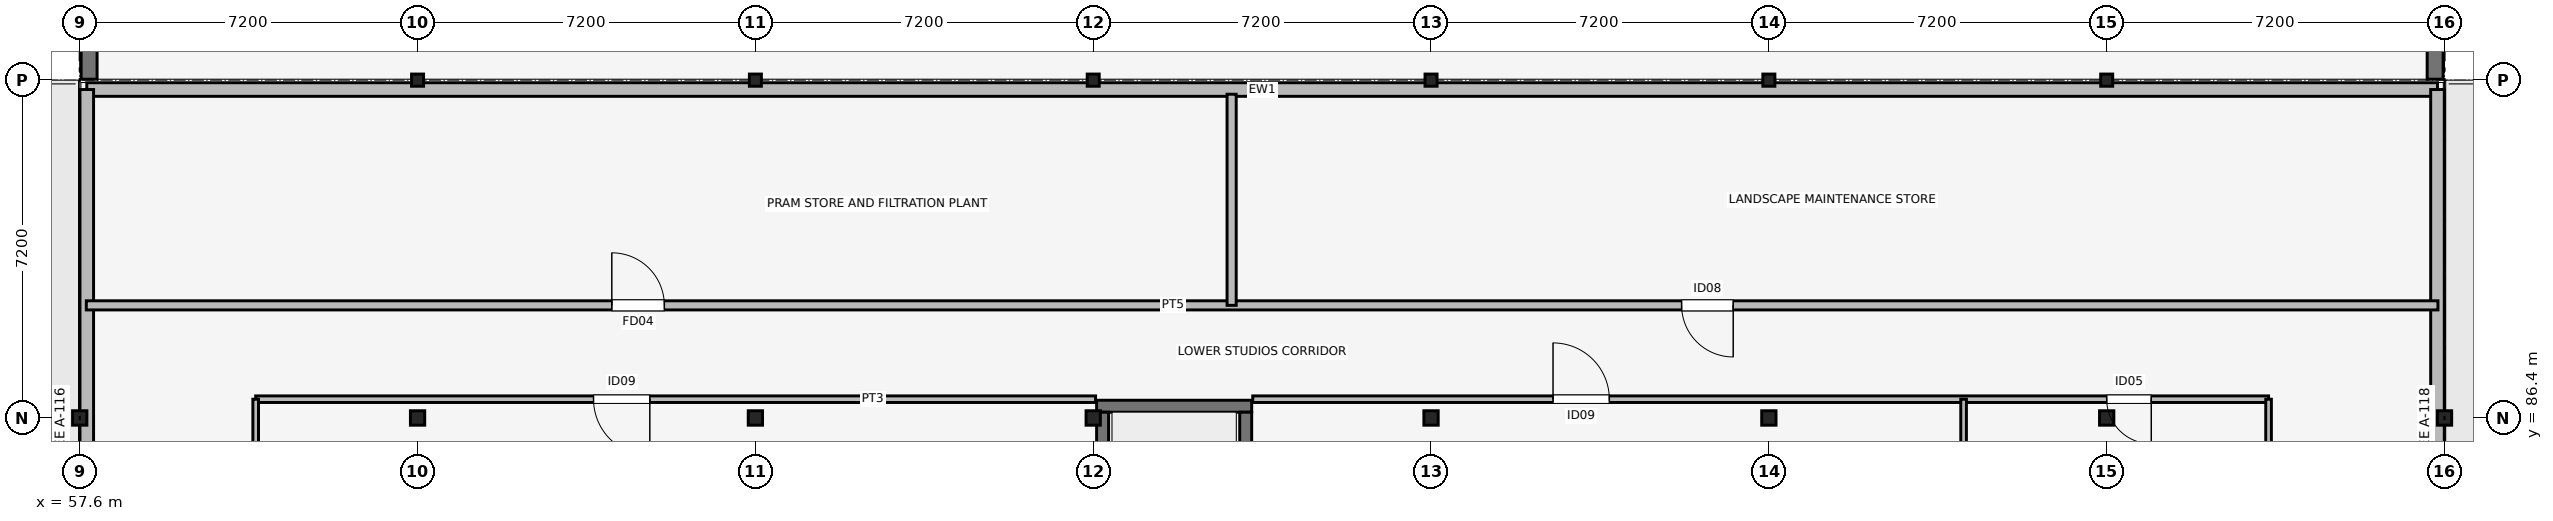
"""IFC4 building model, lengths in metres.
Left out: names, types, materials, properties, quantities, classifications, styles, units other than length and angle.
Written with IfcOpenShell. Run it as: python <this file> out.ifc"""

import sys

from ifc_helpers import new_model, si_unit, direction, frame, frame_2d, origin, origin_2d, place, context, subcontext, project, spatial, rectangle, i_section, extrude, element, fill, save


model = new_model("IFC4")
c1 = context("Model", 3, precision=1e-05, world=origin(), true_north=direction((0.0, 1.0)))
c2 = subcontext(c1, "Body", "Model", "MODEL_VIEW")
j1 = project(units=[si_unit("LENGTHUNIT", "METRE"), si_unit("PLANEANGLEUNIT", "RADIAN")], contexts=[c1])
p1 = place(None, origin())
s1 = spatial("IfcSite", under=j1, at=p1, CompositionType="ELEMENT")
p2 = place(p1, origin())
s2 = spatial("IfcBuilding", under=s1, at=p2, CompositionType="ELEMENT")
p3 = place(p2, origin())
s3 = spatial("IfcBuildingStorey", under=s2, at=p3, CompositionType="ELEMENT", Elevation=0.0)
for number, where, z_axis, x_axis in (
    (1, (57.8, 93.62, 0.0), (0.0, 0.0, 1.0), (0.0, 1.0, 0.0)),
    (2, (107.8, 93.62, 0.0), (0.0, 0.0, 1.0), (0.0, 1.0, 0.0)),
):
    element("IfcWall", number, at=place(p3, frame(where, z_axis=z_axis, x_axis=x_axis)), inside=s3, PredefinedType="USERDEFINED", context=c2, shape_type="SweptSolid", body=[
        extrude(rectangle(XDim=21.58, YDim=0.34, at=frame_2d((10.79, 0.0))), origin(), (0.0, 0.0, 1.0), 4.5),
    ])
for number, where, z_axis, x_axis in (
    (3, (57.6, 86.4, 0.0), (0.0, 0.0, 1.0), (1.0, 0.0, 0.0)),
    (4, (64.8, 86.4, 0.0), (0.0, 0.0, 1.0), (1.0, 0.0, 0.0)),
):
    element("IfcColumn", number, at=place(p3, frame(where, z_axis=z_axis, x_axis=x_axis)), inside=s3, PredefinedType="COLUMN", context=c2, shape_type="SweptSolid", body=[
        extrude(i_section(OverallWidth=0.305, OverallDepth=0.308, WebThickness=0.01, FlangeThickness=0.015, FilletRadius=0.017, at=origin_2d()), origin(), (0.0, 0.0, 1.0), 4.5),
    ])
p4 = place(p3, frame((64.8, 93.6, 0.0), z_axis=(0.0, 0.0, 1.0), x_axis=(1.0, 0.0, 0.0)))
e5 = element("IfcColumn", 5, at=p4, inside=s3, PredefinedType="COLUMN", context=c2, shape_type="SweptSolid", body=[
    extrude(i_section(OverallWidth=0.256, OverallDepth=0.26, WebThickness=0.01, FlangeThickness=0.017, FilletRadius=0.013, at=origin_2d()), origin(), (0.0, 0.0, 1.0), 4.5),
])
p5 = place(p3, frame((72.0, 86.4, 0.0), z_axis=(0.0, 0.0, 1.0), x_axis=(1.0, 0.0, 0.0)))
e6 = element("IfcColumn", 6, at=p5, inside=s3, PredefinedType="COLUMN", context=c2, shape_type="SweptSolid", body=[
    extrude(i_section(OverallWidth=0.305, OverallDepth=0.308, WebThickness=0.01, FlangeThickness=0.015, FilletRadius=0.017, at=origin_2d()), origin(), (0.0, 0.0, 1.0), 4.5),
])
p6 = place(p3, frame((72.0, 93.6, 0.0), z_axis=(0.0, 0.0, 1.0), x_axis=(1.0, 0.0, 0.0)))
e7 = element("IfcColumn", 7, at=p6, inside=s3, PredefinedType="COLUMN", context=c2, shape_type="SweptSolid", body=[
    extrude(i_section(OverallWidth=0.256, OverallDepth=0.26, WebThickness=0.01, FlangeThickness=0.017, FilletRadius=0.013, at=origin_2d()), origin(), (0.0, 0.0, 1.0), 4.5),
])
p7 = place(p3, frame((79.2, 86.4, 0.0), z_axis=(0.0, 0.0, 1.0), x_axis=(1.0, 0.0, 0.0)))
e8 = element("IfcColumn", 8, at=p7, inside=s3, PredefinedType="COLUMN", context=c2, shape_type="SweptSolid", body=[
    extrude(i_section(OverallWidth=0.305, OverallDepth=0.308, WebThickness=0.01, FlangeThickness=0.015, FilletRadius=0.017, at=origin_2d()), origin(), (0.0, 0.0, 1.0), 4.5),
])
p8 = place(p3, frame((79.2, 93.6, 0.0), z_axis=(0.0, 0.0, 1.0), x_axis=(1.0, 0.0, 0.0)))
e9 = element("IfcColumn", 9, at=p8, inside=s3, PredefinedType="COLUMN", context=c2, shape_type="SweptSolid", body=[
    extrude(i_section(OverallWidth=0.256, OverallDepth=0.26, WebThickness=0.01, FlangeThickness=0.017, FilletRadius=0.013, at=origin_2d()), origin(), (0.0, 0.0, 1.0), 4.5),
])
p9 = place(p3, frame((86.4, 86.4, 0.0), z_axis=(0.0, 0.0, 1.0), x_axis=(1.0, 0.0, 0.0)))
e10 = element("IfcColumn", 10, at=p9, inside=s3, PredefinedType="COLUMN", context=c2, shape_type="SweptSolid", body=[
    extrude(i_section(OverallWidth=0.305, OverallDepth=0.308, WebThickness=0.01, FlangeThickness=0.015, FilletRadius=0.017, at=origin_2d()), origin(), (0.0, 0.0, 1.0), 4.5),
])
p10 = place(p3, frame((86.4, 93.6, 0.0), z_axis=(0.0, 0.0, 1.0), x_axis=(1.0, 0.0, 0.0)))
e11 = element("IfcColumn", 11, at=p10, inside=s3, PredefinedType="COLUMN", context=c2, shape_type="SweptSolid", body=[
    extrude(i_section(OverallWidth=0.256, OverallDepth=0.26, WebThickness=0.01, FlangeThickness=0.017, FilletRadius=0.013, at=origin_2d()), origin(), (0.0, 0.0, 1.0), 4.5),
])
p11 = place(p3, frame((93.6, 86.4, 0.0), z_axis=(0.0, 0.0, 1.0), x_axis=(1.0, 0.0, 0.0)))
e12 = element("IfcColumn", 12, at=p11, inside=s3, PredefinedType="COLUMN", context=c2, shape_type="SweptSolid", body=[
    extrude(i_section(OverallWidth=0.305, OverallDepth=0.308, WebThickness=0.01, FlangeThickness=0.015, FilletRadius=0.017, at=origin_2d()), origin(), (0.0, 0.0, 1.0), 4.5),
])
p12 = place(p3, frame((93.6, 93.6, 0.0), z_axis=(0.0, 0.0, 1.0), x_axis=(1.0, 0.0, 0.0)))
e13 = element("IfcColumn", 13, at=p12, inside=s3, PredefinedType="COLUMN", context=c2, shape_type="SweptSolid", body=[
    extrude(i_section(OverallWidth=0.256, OverallDepth=0.26, WebThickness=0.01, FlangeThickness=0.017, FilletRadius=0.013, at=origin_2d()), origin(), (0.0, 0.0, 1.0), 4.5),
])
p13 = place(p3, frame((100.8, 86.4, 0.0), z_axis=(0.0, 0.0, 1.0), x_axis=(1.0, 0.0, 0.0)))
e14 = element("IfcColumn", 14, at=p13, inside=s3, PredefinedType="COLUMN", context=c2, shape_type="SweptSolid", body=[
    extrude(i_section(OverallWidth=0.305, OverallDepth=0.308, WebThickness=0.01, FlangeThickness=0.015, FilletRadius=0.017, at=origin_2d()), origin(), (0.0, 0.0, 1.0), 4.5),
])
p14 = place(p3, frame((100.8, 93.6, 0.0), z_axis=(0.0, 0.0, 1.0), x_axis=(1.0, 0.0, 0.0)))
e15 = element("IfcColumn", 15, at=p14, inside=s3, PredefinedType="COLUMN", context=c2, shape_type="SweptSolid", body=[
    extrude(i_section(OverallWidth=0.256, OverallDepth=0.26, WebThickness=0.01, FlangeThickness=0.017, FilletRadius=0.013, at=origin_2d()), origin(), (0.0, 0.0, 1.0), 4.5),
])
p15 = place(p3, frame((108.0, 86.4, 0.0), z_axis=(0.0, 0.0, 1.0), x_axis=(1.0, 0.0, 0.0)))
e16 = element("IfcColumn", 16, at=p15, inside=s3, PredefinedType="COLUMN", context=c2, shape_type="SweptSolid", body=[
    extrude(i_section(OverallWidth=0.305, OverallDepth=0.308, WebThickness=0.01, FlangeThickness=0.015, FilletRadius=0.017, at=origin_2d()), origin(), (0.0, 0.0, 1.0), 4.5),
])
p16 = place(p3, frame((79.272, 86.65, 0.0), z_axis=(0.0, 0.0, 1.0), x_axis=(1.0, 0.0, 0.0)))
e17 = element("IfcWall", 17, at=p16, inside=s3, PredefinedType="SHEAR", context=c2, shape_type="SweptSolid", body=[
    extrude(rectangle(XDim=3.305, YDim=0.255, at=frame_2d((1.652, 0.0))), origin(), (0.0, 0.0, 1.0), 4.5),
])
p17 = place(p3, frame((79.4, 80.228, 0.0), z_axis=(0.0, 0.0, 1.0), x_axis=(0.0, 1.0, 0.0)))
e18 = element("IfcWall", 18, at=p17, inside=s3, PredefinedType="SHEAR", context=c2, shape_type="SweptSolid", body=[
    extrude(rectangle(XDim=6.295, YDim=0.255, at=frame_2d((3.147, 0.0))), origin(), (0.0, 0.0, 1.0), 4.5),
])
p18 = place(p3, frame((82.45, 80.228, 0.0), z_axis=(0.0, 0.0, 1.0), x_axis=(0.0, 1.0, 0.0)))
e19 = element("IfcWall", 19, at=p18, inside=s3, PredefinedType="SHEAR", context=c2, shape_type="SweptSolid", body=[
    extrude(rectangle(XDim=6.295, YDim=0.255, at=frame_2d((3.147, 0.0))), origin(), (0.0, 0.0, 1.0), 4.5),
])
p19 = place(p18, frame((1.3, 0.0, 0.0), z_axis=(0.0, 0.0, 1.0), x_axis=(-1.0, 0.0, 0.0)))
e20 = element("IfcOpeningElement", 20, at=p19, cuts=e19, PredefinedType="OPENING", context=c2, shape_type="SweptSolid", body=[
    extrude(rectangle(XDim=1.05, YDim=2.12, at=frame_2d((0.525, 1.06))), frame((0.0, 0.137, 0.0), z_axis=(0.0, -1.0, 0.0), x_axis=(1.0, 0.0, 0.0)), (0.0, 0.0, 1.0), 0.275),
])
p20 = place(p3, frame((57.75, 93.4, 0.0), z_axis=(0.0, 0.0, 1.0), x_axis=(1.0, 0.0, 0.0)))
e21 = element("IfcWall", 21, at=p20, inside=s3, PredefinedType="SOLIDWALL", context=c2, shape_type="SweptSolid", body=[
    extrude(rectangle(XDim=50.1, YDim=0.29, at=frame_2d((25.05, 0.0))), origin(), (0.0, 0.0, 1.0), 3.701),
])
p21 = place(p3, frame((57.75, 79.4, 0.0), z_axis=(0.0, 0.0, 1.0), x_axis=(0.0, 1.0, 0.0)))
e22 = element("IfcWall", 22, at=p21, inside=s3, PredefinedType="SOLIDWALL", context=c2, shape_type="SweptSolid", body=[
    extrude(rectangle(XDim=14.0, YDim=0.29, at=frame_2d((7.0, 0.0))), origin(), (0.0, 0.0, 1.0), 3.701),
])
p22 = place(p21, frame((2.8, 0.0, 0.0)))
e23 = element("IfcOpeningElement", 23, at=p22, cuts=e22, PredefinedType="OPENING", context=c2, shape_type="SweptSolid", body=[
    extrude(rectangle(XDim=1.5, YDim=2.35, at=frame_2d((0.75, 1.175))), frame((0.0, 0.155, 0.0), z_axis=(0.0, -1.0, 0.0), x_axis=(1.0, 0.0, 0.0)), (0.0, 0.0, 1.0), 0.31),
])
p23 = place(p3, frame((107.85, 79.4, 0.0), z_axis=(0.0, 0.0, 1.0), x_axis=(0.0, 1.0, 0.0)))
e24 = element("IfcWall", 24, at=p23, inside=s3, PredefinedType="SOLIDWALL", context=c2, shape_type="SweptSolid", body=[
    extrude(rectangle(XDim=14.0, YDim=0.29, at=frame_2d((7.0, 0.0))), origin(), (0.0, 0.0, 1.0), 3.701),
])
p24 = place(p23, frame((4.3, 0.0, 0.0), z_axis=(0.0, 0.0, 1.0), x_axis=(-1.0, 0.0, 0.0)))
e25 = element("IfcOpeningElement", 25, at=p24, cuts=e24, PredefinedType="OPENING", context=c2, shape_type="SweptSolid", body=[
    extrude(rectangle(XDim=1.5, YDim=2.35, at=frame_2d((0.75, 1.175))), frame((0.0, 0.155, 0.0), z_axis=(0.0, -1.0, 0.0), x_axis=(1.0, 0.0, 0.0)), (0.0, 0.0, 1.0), 0.31),
])
p25 = place(p3, frame((61.35, 86.8, 0.0), z_axis=(0.0, 0.0, 1.0), x_axis=(1.0, 0.0, 0.0)))
e26 = element("IfcWall", 26, at=p25, inside=s3, PredefinedType="PARTITIONING", context=c2, shape_type="SweptSolid", body=[
    extrude(rectangle(XDim=17.9, YDim=0.14, at=frame_2d((8.95, 0.0))), origin(), (0.0, 0.0, 1.0), 3.5),
])
p26 = place(p25, frame((8.4, 0.0, 0.0), z_axis=(0.0, 0.0, 1.0), x_axis=(-1.0, 0.0, 0.0)))
e27 = element("IfcOpeningElement", 27, at=p26, cuts=e26, PredefinedType="OPENING", context=c2, shape_type="SweptSolid", body=[
    extrude(rectangle(XDim=1.2, YDim=2.18, at=frame_2d((0.6, 1.09))), frame((0.0, 0.08, 0.0), z_axis=(0.0, -1.0, 0.0), x_axis=(1.0, 0.0, 0.0)), (0.0, 0.0, 1.0), 0.16),
])
p27 = place(p3, frame((82.6, 86.8, 0.0), z_axis=(0.0, 0.0, 1.0), x_axis=(1.0, 0.0, 0.0)))
e28 = element("IfcWall", 28, at=p27, inside=s3, PredefinedType="PARTITIONING", context=c2, shape_type="SweptSolid", body=[
    extrude(rectangle(XDim=21.65, YDim=0.14, at=frame_2d((10.825, 0.0))), origin(), (0.0, 0.0, 1.0), 3.5),
])
p28 = place(p27, frame((6.4, 0.0, 0.0)))
e29 = element("IfcOpeningElement", 29, at=p28, cuts=e28, PredefinedType="OPENING", context=c2, shape_type="SweptSolid", body=[
    extrude(rectangle(XDim=1.2, YDim=2.18, at=frame_2d((0.6, 1.09))), frame((0.0, 0.08, 0.0), z_axis=(0.0, -1.0, 0.0), x_axis=(1.0, 0.0, 0.0)), (0.0, 0.0, 1.0), 0.16),
])
p29 = place(p27, frame((19.15, 0.0, 0.0), z_axis=(0.0, 0.0, 1.0), x_axis=(-1.0, 0.0, 0.0)))
e30 = element("IfcOpeningElement", 30, at=p29, cuts=e28, PredefinedType="OPENING", context=c2, shape_type="SweptSolid", body=[
    extrude(rectangle(XDim=0.95, YDim=2.12, at=frame_2d((0.475, 1.06))), frame((0.0, 0.08, 0.0), z_axis=(0.0, -1.0, 0.0), x_axis=(1.0, 0.0, 0.0)), (0.0, 0.0, 1.0), 0.16),
])
for number, where, z_axis, x_axis in (
    (31, (61.35, 79.4, 0.0), (0.0, 0.0, 1.0), (0.0, 1.0, 0.0)),
    (32, (97.75, 79.4, 0.0), (0.0, 0.0, 1.0), (0.0, 1.0, 0.0)),
    (33, (104.25, 79.4, 0.0), (0.0, 0.0, 1.0), (0.0, 1.0, 0.0)),
):
    element("IfcWall", number, at=place(p3, frame(where, z_axis=z_axis, x_axis=x_axis)), inside=s3, PredefinedType="PARTITIONING", context=c2, shape_type="SweptSolid", body=[
        extrude(rectangle(XDim=7.4, YDim=0.12, at=frame_2d((3.7, 0.0))), origin(), (0.0, 0.0, 1.0), 3.5),
    ])
p30 = place(p3, frame((57.74, 88.8, 0.0), z_axis=(0.0, 0.0, 1.0), x_axis=(1.0, 0.0, 0.0)))
e34 = element("IfcWall", 34, at=p30, inside=s3, PredefinedType="PARTITIONING", context=c2, shape_type="SweptSolid", body=[
    extrude(rectangle(XDim=50.12, YDim=0.195, at=frame_2d((25.06, 0.0))), origin(), (0.0, 0.0, 1.0), 3.5),
])
p31 = place(p30, frame((11.2, 0.0, 0.0)))
e35 = element("IfcOpeningElement", 35, at=p31, cuts=e34, PredefinedType="OPENING", context=c2, shape_type="SweptSolid", body=[
    extrude(rectangle(XDim=1.12, YDim=2.15, at=frame_2d((0.56, 1.075))), frame((0.0, 0.107, 0.0), z_axis=(0.0, -1.0, 0.0), x_axis=(1.0, 0.0, 0.0)), (0.0, 0.0, 1.0), 0.215),
])
p32 = place(p30, frame((35.1, 0.0, 0.0), z_axis=(0.0, 0.0, 1.0), x_axis=(-1.0, 0.0, 0.0)))
e36 = element("IfcOpeningElement", 36, at=p32, cuts=e34, PredefinedType="OPENING", context=c2, shape_type="SweptSolid", body=[
    extrude(rectangle(XDim=1.1, YDim=2.15, at=frame_2d((0.55, 1.075))), frame((0.0, 0.107, 0.0), z_axis=(0.0, -1.0, 0.0), x_axis=(1.0, 0.0, 0.0)), (0.0, 0.0, 1.0), 0.215),
])
p33 = place(p3, frame((82.15, 88.8, 0.0), z_axis=(0.0, 0.0, 1.0), x_axis=(0.0, 1.0, 0.0)))
e37 = element("IfcWall", 37, at=p33, inside=s3, PredefinedType="PARTITIONING", context=c2, shape_type="SweptSolid", body=[
    extrude(rectangle(XDim=4.5, YDim=0.195, at=frame_2d((2.25, 0.0))), origin(), (0.0, 0.0, 1.0), 3.5),
])
p34 = place(p26, origin())
e38 = element("IfcDoor", 38, at=p34, inside=s3, OperationType="SINGLE_SWING_RIGHT", PredefinedType="DOOR", context=c2, shape_type="SweptSolid", body=[
    extrude(rectangle(XDim=1.2, YDim=2.18, at=frame_2d((0.6, 1.09))), frame((0.0, 0.025, 0.0), z_axis=(0.0, -1.0, 0.0), x_axis=(1.0, 0.0, 0.0)), (0.0, 0.0, 1.0), 0.05),
])
fill(e27, e38)
p35 = place(p28, origin())
e39 = element("IfcDoor", 39, at=p35, inside=s3, OperationType="SINGLE_SWING_LEFT", PredefinedType="DOOR", context=c2, shape_type="SweptSolid", body=[
    extrude(rectangle(XDim=1.2, YDim=2.18, at=frame_2d((0.6, 1.09))), frame((0.0, 0.025, 0.0), z_axis=(0.0, -1.0, 0.0), x_axis=(1.0, 0.0, 0.0)), (0.0, 0.0, 1.0), 0.05),
])
fill(e29, e39)
p36 = place(p29, origin())
e40 = element("IfcDoor", 40, at=p36, inside=s3, OperationType="SINGLE_SWING_RIGHT", PredefinedType="DOOR", context=c2, shape_type="SweptSolid", body=[
    extrude(rectangle(XDim=0.95, YDim=2.12, at=frame_2d((0.475, 1.06))), frame((0.0, 0.025, 0.0), z_axis=(0.0, -1.0, 0.0), x_axis=(1.0, 0.0, 0.0)), (0.0, 0.0, 1.0), 0.05),
])
fill(e30, e40)
p37 = place(p31, origin())
e41 = element("IfcDoor", 41, at=p37, inside=s3, OperationType="SINGLE_SWING_LEFT", PredefinedType="DOOR", context=c2, shape_type="SweptSolid", body=[
    extrude(rectangle(XDim=1.12, YDim=2.15, at=frame_2d((0.56, 1.075))), frame((0.0, 0.025, 0.0), z_axis=(0.0, -1.0, 0.0), x_axis=(1.0, 0.0, 0.0)), (0.0, 0.0, 1.0), 0.05),
])
fill(e35, e41)
p38 = place(p32, origin())
e42 = element("IfcDoor", 42, at=p38, inside=s3, OperationType="SINGLE_SWING_RIGHT", PredefinedType="DOOR", context=c2, shape_type="SweptSolid", body=[
    extrude(rectangle(XDim=1.1, YDim=2.15, at=frame_2d((0.55, 1.075))), frame((0.0, 0.025, 0.0), z_axis=(0.0, -1.0, 0.0), x_axis=(1.0, 0.0, 0.0)), (0.0, 0.0, 1.0), 0.05),
])
fill(e36, e42)
save(model, sys.argv[1])
